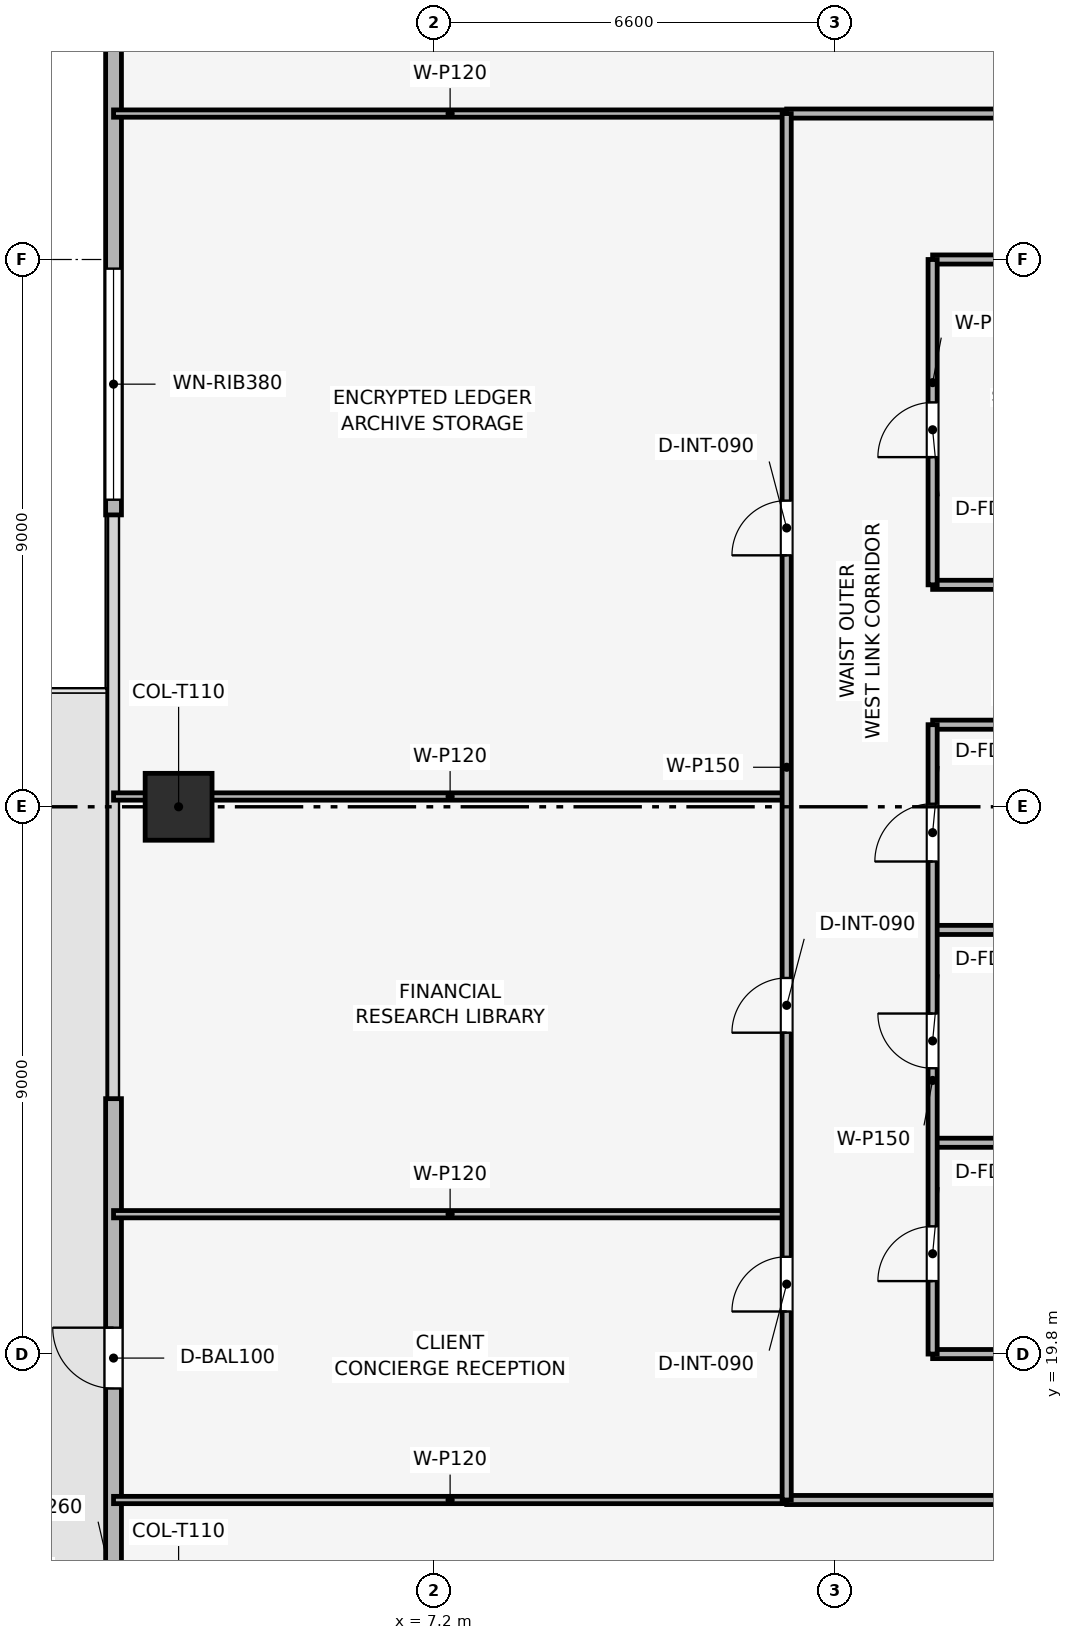
"""IFC4 building model, lengths in metres.
Left out: names, types, materials, properties, quantities, classifications, styles, units other than length and angle.
Written with IfcOpenShell. Run it as: python <this file> out.ifc"""

import sys

from ifc_helpers import new_model, si_unit, direction, frame, frame_2d, origin, origin_2d, place, context, subcontext, project, spatial, rectangle, extrude, element, fill, save


model = new_model("IFC4")
c1 = context("Model", 3, precision=1e-05, world=origin(), true_north=direction((0.0, 1.0)))
c2 = subcontext(c1, "Body", "Model", "MODEL_VIEW")
j1 = project(units=[si_unit("LENGTHUNIT", "METRE"), si_unit("PLANEANGLEUNIT", "RADIAN")], contexts=[c1])
p1 = place(None, origin())
s1 = spatial("IfcSite", under=j1, at=p1, CompositionType="ELEMENT")
p2 = place(p1, origin())
s2 = spatial("IfcBuilding", under=s1, at=p2, CompositionType="ELEMENT")
p3 = place(p2, frame((0.0, 0.0, 222.45)))
s3 = spatial("IfcBuildingStorey", under=s2, at=p3, CompositionType="ELEMENT", Elevation=222.45)
p4 = place(p3, frame((3.0, 28.8, 0.003), z_axis=(0.0, 0.0, 1.0), x_axis=(1.0, 0.0, 0.0)))
e1 = element("IfcColumn", 1, at=p4, inside=s3, PredefinedType="COLUMN", context=c2, shape_type="SweptSolid", body=[
    extrude(rectangle(XDim=1.1, YDim=1.1, at=origin_2d()), origin(), (0.0, 0.0, 1.0), 3.494),
])
p5 = place(p3, frame((1.93, 9.3, 0.0), z_axis=(0.0, 0.0, 1.0), x_axis=(0.0, 1.0, 0.0)))
e2 = element("IfcWall", 2, at=p5, inside=s3, PredefinedType="SOLIDWALL", context=c2, shape_type="SweptSolid", body=[
    extrude(rectangle(XDim=14.7, YDim=0.26, at=frame_2d((7.35, 0.0))), origin(), (0.0, 0.0, 1.0), 3.5),
])
p6 = place(p5, frame((9.934, 0.0, 0.0)))
e3 = element("IfcOpeningElement", 3, at=p6, cuts=e2, PredefinedType="OPENING", context=c2, shape_type="SweptSolid", body=[
    extrude(rectangle(XDim=1.0, YDim=2.2, at=frame_2d((0.5, 1.1))), frame((0.0, 0.14, 0.0), z_axis=(0.0, -1.0, 0.0), x_axis=(1.0, 0.0, 0.0)), (0.0, 0.0, 1.0), 0.28),
])
p7 = place(p3, frame((1.93, 33.6, 0.0), z_axis=(0.0, 0.0, 1.0), x_axis=(0.0, 1.0, 0.0)))
e4 = element("IfcWall", 4, at=p7, inside=s3, PredefinedType="SOLIDWALL", context=c2, shape_type="SweptSolid", body=[
    extrude(rectangle(XDim=14.7, YDim=0.26, at=frame_2d((7.35, 0.0))), origin(), (0.0, 0.0, 1.0), 3.5),
])
p8 = place(p7, frame((0.25, 0.0, 0.9)))
e5 = element("IfcOpeningElement", 5, at=p8, cuts=e4, PredefinedType="OPENING", context=c2, shape_type="SweptSolid", body=[
    extrude(rectangle(XDim=3.8, YDim=1.9, at=frame_2d((1.9, 0.95))), frame((0.0, 0.14, 0.0), z_axis=(0.0, -1.0, 0.0), x_axis=(1.0, 0.0, 0.0)), (0.0, 0.0, 1.0), 0.28),
])
p9 = place(p3, frame((15.4, 19.8, 0.0), z_axis=(0.0, 0.0, 1.0), x_axis=(1.0, 0.0, 0.0)))
e6 = element("IfcWall", 6, at=p9, inside=s3, PredefinedType="PARTITIONING", context=c2, shape_type="SweptSolid", body=[
    extrude(rectangle(XDim=4.4, YDim=0.15, at=frame_2d((2.2, 0.0))), origin(), (0.0, 0.0, 1.0), 3.035),
])
for number, where, z_axis, x_axis in (
    (7, (15.4, 23.275, 0.0), (0.0, 0.0, 1.0), (1.0, 0.0, 0.0)),
    (8, (15.4, 26.775, 0.0), (0.0, 0.0, 1.0), (1.0, 0.0, 0.0)),
    (9, (15.4, 30.15, 0.0), (0.0, 0.0, 1.0), (1.0, 0.0, 0.0)),
    (10, (15.4, 32.45, 0.0), (0.0, 0.0, 1.0), (1.0, 0.0, 0.0)),
):
    element("IfcWall", number, at=place(p3, frame(where, z_axis=z_axis, x_axis=x_axis)), inside=s3, PredefinedType="PARTITIONING", context=c2, shape_type="SweptSolid", body=[
        extrude(rectangle(XDim=4.4, YDim=0.15, at=frame_2d((2.2, 0.0))), origin(), (0.0, 0.0, 1.0), 3.5),
    ])
p10 = place(p3, frame((15.4, 37.8, 0.0), z_axis=(0.0, 0.0, 1.0), x_axis=(1.0, 0.0, 0.0)))
e11 = element("IfcWall", 11, at=p10, inside=s3, PredefinedType="PARTITIONING", context=c2, shape_type="SweptSolid", body=[
    extrude(rectangle(XDim=4.4, YDim=0.15, at=frame_2d((2.2, 0.0))), origin(), (0.0, 0.0, 1.0), 3.035),
])
p11 = place(p3, frame((15.4, 19.8, 0.0), z_axis=(0.0, 0.0, 1.0), x_axis=(0.0, 1.0, 0.0)))
e12 = element("IfcWall", 12, at=p11, inside=s3, PredefinedType="PARTITIONING", context=c2, shape_type="SweptSolid", body=[
    extrude(rectangle(XDim=10.35, YDim=0.15, at=frame_2d((5.175, 0.0))), origin(), (0.0, 0.0, 1.0), 3.035),
])
p12 = place(p11, frame((1.2, 0.0, 0.0)))
e13 = element("IfcOpeningElement", 13, at=p12, cuts=e12, PredefinedType="OPENING", context=c2, shape_type="SweptSolid", body=[
    extrude(rectangle(XDim=0.9, YDim=2.1, at=frame_2d((0.45, 1.05))), frame((0.0, 0.085, 0.0), z_axis=(0.0, -1.0, 0.0), x_axis=(1.0, 0.0, 0.0)), (0.0, 0.0, 1.0), 0.17),
])
p13 = place(p11, frame((4.7, 0.0, 0.0)))
e14 = element("IfcOpeningElement", 14, at=p13, cuts=e12, PredefinedType="OPENING", context=c2, shape_type="SweptSolid", body=[
    extrude(rectangle(XDim=0.9, YDim=2.1, at=frame_2d((0.45, 1.05))), frame((0.0, 0.085, 0.0), z_axis=(0.0, -1.0, 0.0), x_axis=(1.0, 0.0, 0.0)), (0.0, 0.0, 1.0), 0.17),
])
p14 = place(p11, frame((8.1, 0.0, 0.0)))
e15 = element("IfcOpeningElement", 15, at=p14, cuts=e12, PredefinedType="OPENING", context=c2, shape_type="SweptSolid", body=[
    extrude(rectangle(XDim=0.95, YDim=2.1, at=frame_2d((0.475, 1.05))), frame((0.0, 0.085, 0.0), z_axis=(0.0, -1.0, 0.0), x_axis=(1.0, 0.0, 0.0)), (0.0, 0.0, 1.0), 0.17),
])
p15 = place(p3, frame((15.4, 32.45, 0.0), z_axis=(0.0, 0.0, 1.0), x_axis=(0.0, 1.0, 0.0)))
e16 = element("IfcWall", 16, at=p15, inside=s3, PredefinedType="PARTITIONING", context=c2, shape_type="SweptSolid", body=[
    extrude(rectangle(XDim=5.35, YDim=0.15, at=frame_2d((2.675, 0.0))), origin(), (0.0, 0.0, 1.0), 3.035),
])
p16 = place(p15, frame((2.1, 0.0, 0.0)))
e17 = element("IfcOpeningElement", 17, at=p16, cuts=e16, PredefinedType="OPENING", context=c2, shape_type="SweptSolid", body=[
    extrude(rectangle(XDim=0.9, YDim=2.1, at=frame_2d((0.45, 1.05))), frame((0.0, 0.085, 0.0), z_axis=(0.0, -1.0, 0.0), x_axis=(1.0, 0.0, 0.0)), (0.0, 0.0, 1.0), 0.17),
])
for number, where, z_axis, x_axis in (
    (18, (1.93, 22.1, 0.0), (0.0, 0.0, 1.0), (1.0, 0.0, 0.0)),
    (19, (1.93, 28.969, 0.0), (0.0, 0.0, 1.0), (1.0, 0.0, 0.0)),
    (20, (1.93, 17.4, 0.0), (0.0, 0.0, 1.0), (1.0, 0.0, 0.0)),
    (21, (1.93, 40.2, 0.0), (0.0, 0.0, 1.0), (1.0, 0.0, 0.0)),
):
    element("IfcWall", number, at=place(p3, frame(where, z_axis=z_axis, x_axis=x_axis)), inside=s3, PredefinedType="PARTITIONING", context=c2, shape_type="SweptSolid", body=[
        extrude(rectangle(XDim=11.07, YDim=0.12, at=frame_2d((5.535, 0.0))), origin(), (0.0, 0.0, 1.0), 2.885),
    ])
p17 = place(p3, frame((13.0, 17.4, 0.0), z_axis=(0.0, 0.0, 1.0), x_axis=(1.0, 0.0, 0.0)))
e22 = element("IfcWall", 22, at=p17, inside=s3, PredefinedType="PARTITIONING", context=c2, shape_type="SweptSolid", body=[
    extrude(rectangle(XDim=31.6, YDim=0.15, at=frame_2d((15.8, 0.0))), origin(), (0.0, 0.0, 1.0), 3.035),
])
p18 = place(p17, frame((15.35, 0.0, 0.0)))
e23 = element("IfcOpeningElement", 23, at=p18, cuts=e22, PredefinedType="OPENING", context=c2, shape_type="SweptSolid", body=[
    extrude(rectangle(XDim=0.9, YDim=2.1, at=frame_2d((0.45, 1.05))), frame((0.0, 0.085, 0.0), z_axis=(0.0, -1.0, 0.0), x_axis=(1.0, 0.0, 0.0)), (0.0, 0.0, 1.0), 0.17),
])
p19 = place(p3, frame((13.0, 40.2, 0.0), z_axis=(0.0, 0.0, 1.0), x_axis=(1.0, 0.0, 0.0)))
e24 = element("IfcWall", 24, at=p19, inside=s3, PredefinedType="PARTITIONING", context=c2, shape_type="SweptSolid", body=[
    extrude(rectangle(XDim=31.6, YDim=0.15, at=frame_2d((15.8, 0.0))), origin(), (0.0, 0.0, 1.0), 3.035),
])
p20 = place(p19, frame((5.02, 0.0, 0.0)))
e25 = element("IfcOpeningElement", 25, at=p20, cuts=e24, PredefinedType="OPENING", context=c2, shape_type="SweptSolid", body=[
    extrude(rectangle(XDim=0.9, YDim=2.1, at=frame_2d((0.45, 1.05))), frame((0.0, 0.085, 0.0), z_axis=(0.0, -1.0, 0.0), x_axis=(1.0, 0.0, 0.0)), (0.0, 0.0, 1.0), 0.17),
])
p21 = place(p19, frame((20.82, 0.0, 0.0)))
e26 = element("IfcOpeningElement", 26, at=p21, cuts=e24, PredefinedType="OPENING", context=c2, shape_type="SweptSolid", body=[
    extrude(rectangle(XDim=0.9, YDim=2.1, at=frame_2d((0.45, 1.05))), frame((0.0, 0.085, 0.0), z_axis=(0.0, -1.0, 0.0), x_axis=(1.0, 0.0, 0.0)), (0.0, 0.0, 1.0), 0.17),
])
p22 = place(p3, frame((13.0, 17.4, 0.0), z_axis=(0.0, 0.0, 1.0), x_axis=(0.0, 1.0, 0.0)))
e27 = element("IfcWall", 27, at=p22, inside=s3, PredefinedType="PARTITIONING", context=c2, shape_type="SweptSolid", body=[
    extrude(rectangle(XDim=22.8, YDim=0.15, at=frame_2d((11.4, 0.0))), origin(), (0.0, 0.0, 1.0), 3.035),
])
p23 = place(p22, frame((3.1, 0.0, 0.0)))
e28 = element("IfcOpeningElement", 28, at=p23, cuts=e27, PredefinedType="OPENING", context=c2, shape_type="SweptSolid", body=[
    extrude(rectangle(XDim=0.9, YDim=2.1, at=frame_2d((0.45, 1.05))), frame((0.0, 0.085, 0.0), z_axis=(0.0, -1.0, 0.0), x_axis=(1.0, 0.0, 0.0)), (0.0, 0.0, 1.0), 0.17),
])
p24 = place(p22, frame((7.685, 0.0, 0.0)))
e29 = element("IfcOpeningElement", 29, at=p24, cuts=e27, PredefinedType="OPENING", context=c2, shape_type="SweptSolid", body=[
    extrude(rectangle(XDim=0.9, YDim=2.1, at=frame_2d((0.45, 1.05))), frame((0.0, 0.085, 0.0), z_axis=(0.0, -1.0, 0.0), x_axis=(1.0, 0.0, 0.0)), (0.0, 0.0, 1.0), 0.17),
])
p25 = place(p22, frame((15.535, 0.0, 0.0)))
e30 = element("IfcOpeningElement", 30, at=p25, cuts=e27, PredefinedType="OPENING", context=c2, shape_type="SweptSolid", body=[
    extrude(rectangle(XDim=0.9, YDim=2.1, at=frame_2d((0.45, 1.05))), frame((0.0, 0.085, 0.0), z_axis=(0.0, -1.0, 0.0), x_axis=(1.0, 0.0, 0.0)), (0.0, 0.0, 1.0), 0.17),
])
p26 = place(p6, origin())
e31 = element("IfcDoor", 31, at=p26, inside=s3, OperationType="SINGLE_SWING_RIGHT", PredefinedType="DOOR", context=c2, shape_type="SweptSolid", body=[
    extrude(rectangle(XDim=1.0, YDim=2.2, at=frame_2d((0.5, 1.1))), frame((0.0, 0.025, 0.0), z_axis=(0.0, -1.0, 0.0), x_axis=(1.0, 0.0, 0.0)), (0.0, 0.0, 1.0), 0.05),
])
fill(e3, e31)
p27 = place(p8, origin())
e32 = element("IfcWindow", 32, at=p27, inside=s3, PartitioningType="SINGLE_PANEL", PredefinedType="WINDOW", context=c2, shape_type="SweptSolid", body=[
    extrude(rectangle(XDim=3.8, YDim=1.9, at=frame_2d((1.9, 0.95))), frame((0.0, 0.03, 0.0), z_axis=(0.0, -1.0, 0.0), x_axis=(1.0, 0.0, 0.0)), (0.0, 0.0, 1.0), 0.06),
])
fill(e5, e32)
p28 = place(p12, origin())
e33 = element("IfcDoor", 33, at=p28, inside=s3, OperationType="SINGLE_SWING_LEFT", PredefinedType="DOOR", context=c2, shape_type="SweptSolid", body=[
    extrude(rectangle(XDim=0.9, YDim=2.1, at=frame_2d((0.45, 1.05))), frame((0.0, 0.025, 0.0), z_axis=(0.0, -1.0, 0.0), x_axis=(1.0, 0.0, 0.0)), (0.0, 0.0, 1.0), 0.05),
])
fill(e13, e33)
p29 = place(p13, origin())
e34 = element("IfcDoor", 34, at=p29, inside=s3, OperationType="SINGLE_SWING_RIGHT", PredefinedType="DOOR", context=c2, shape_type="SweptSolid", body=[
    extrude(rectangle(XDim=0.9, YDim=2.1, at=frame_2d((0.45, 1.05))), frame((0.0, 0.025, 0.0), z_axis=(0.0, -1.0, 0.0), x_axis=(1.0, 0.0, 0.0)), (0.0, 0.0, 1.0), 0.05),
])
fill(e14, e34)
p30 = place(p14, origin())
e35 = element("IfcDoor", 35, at=p30, inside=s3, OperationType="SINGLE_SWING_LEFT", PredefinedType="DOOR", context=c2, shape_type="SweptSolid", body=[
    extrude(rectangle(XDim=0.95, YDim=2.1, at=frame_2d((0.475, 1.05))), frame((0.0, 0.025, 0.0), z_axis=(0.0, -1.0, 0.0), x_axis=(1.0, 0.0, 0.0)), (0.0, 0.0, 1.0), 0.05),
])
fill(e15, e35)
p31 = place(p16, origin())
e36 = element("IfcDoor", 36, at=p31, inside=s3, OperationType="SINGLE_SWING_LEFT", PredefinedType="DOOR", context=c2, shape_type="SweptSolid", body=[
    extrude(rectangle(XDim=0.9, YDim=2.1, at=frame_2d((0.45, 1.05))), frame((0.0, 0.025, 0.0), z_axis=(0.0, -1.0, 0.0), x_axis=(1.0, 0.0, 0.0)), (0.0, 0.0, 1.0), 0.05),
])
fill(e17, e36)
p32 = place(p23, origin())
e37 = element("IfcDoor", 37, at=p32, inside=s3, OperationType="SINGLE_SWING_LEFT", PredefinedType="DOOR", context=c2, shape_type="SweptSolid", body=[
    extrude(rectangle(XDim=0.9, YDim=2.1, at=frame_2d((0.45, 1.05))), frame((0.0, 0.025, 0.0), z_axis=(0.0, -1.0, 0.0), x_axis=(1.0, 0.0, 0.0)), (0.0, 0.0, 1.0), 0.05),
])
fill(e28, e37)
p33 = place(p24, origin())
e38 = element("IfcDoor", 38, at=p33, inside=s3, OperationType="SINGLE_SWING_LEFT", PredefinedType="DOOR", context=c2, shape_type="SweptSolid", body=[
    extrude(rectangle(XDim=0.9, YDim=2.1, at=frame_2d((0.45, 1.05))), frame((0.0, 0.025, 0.0), z_axis=(0.0, -1.0, 0.0), x_axis=(1.0, 0.0, 0.0)), (0.0, 0.0, 1.0), 0.05),
])
fill(e29, e38)
p34 = place(p25, origin())
e39 = element("IfcDoor", 39, at=p34, inside=s3, OperationType="SINGLE_SWING_LEFT", PredefinedType="DOOR", context=c2, shape_type="SweptSolid", body=[
    extrude(rectangle(XDim=0.9, YDim=2.1, at=frame_2d((0.45, 1.05))), frame((0.0, 0.025, 0.0), z_axis=(0.0, -1.0, 0.0), x_axis=(1.0, 0.0, 0.0)), (0.0, 0.0, 1.0), 0.05),
])
fill(e30, e39)
save(model, sys.argv[1])
